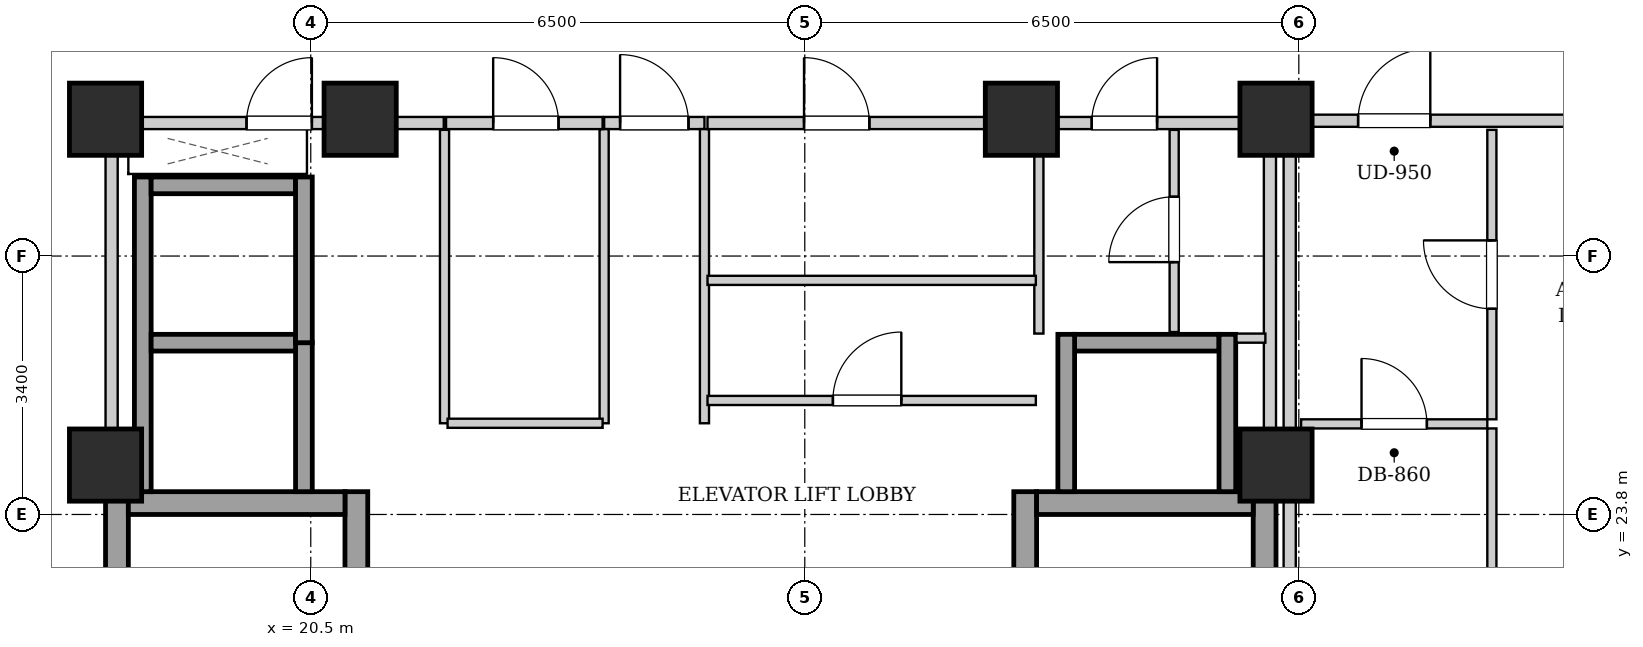
"""IFC4 building model, lengths in metres.
Left out: names, types, materials, properties, quantities, classifications, styles, units other than length and angle.
Written with IfcOpenShell. Run it as: python <this file> out.ifc"""

import sys

from ifc_helpers import new_model, si_unit, direction, frame, frame_2d, origin, origin_2d, place, context, subcontext, project, spatial, rectangle, extrude, element, fill, save


model = new_model("IFC4")
c1 = context("Model", 3, precision=1e-05, world=origin(), true_north=direction((0.0, 1.0)))
c2 = subcontext(c1, "Body", "Model", "MODEL_VIEW")
j1 = project(units=[si_unit("LENGTHUNIT", "METRE"), si_unit("PLANEANGLEUNIT", "RADIAN")], contexts=[c1])
p1 = place(None, origin())
s1 = spatial("IfcSite", under=j1, at=p1, CompositionType="ELEMENT")
p2 = place(p1, origin())
s2 = spatial("IfcBuilding", under=s1, at=p2, CompositionType="ELEMENT")
p3 = place(p2, frame((0.0, 0.0, 134.15)))
s3 = spatial("IfcBuildingStorey", under=s2, at=p3, CompositionType="ELEMENT", Elevation=134.15)
for number, where, z_axis, x_axis in (
    (1, (17.8, 29.0, 0.0), (0.0, 0.0, 1.0), (1.0, 0.0, 0.0)),
    (2, (21.15, 29.0, 0.0), (0.0, 0.0, 1.0), (1.0, 0.0, 0.0)),
    (3, (29.85, 29.0, 0.0), (0.0, 0.0, 1.0), (1.0, 0.0, 0.0)),
    (4, (33.2, 29.0, 0.0), (0.0, 0.0, 1.0), (1.0, 0.0, 0.0)),
    (5, (17.8, 24.45, 0.0), (0.0, 0.0, 1.0), (1.0, 0.0, 0.0)),
    (6, (33.2, 24.45, 0.0), (0.0, 0.0, 1.0), (1.0, 0.0, 0.0)),
):
    element("IfcColumn", number, at=place(p3, frame(where, z_axis=z_axis, x_axis=x_axis)), inside=s3, PredefinedType="COLUMN", context=c2, shape_type="SweptSolid", body=[
        extrude(rectangle(XDim=0.95, YDim=0.95, at=origin_2d()), origin(), (0.0, 0.0, 1.0), 3.25),
    ])
for number, where, z_axis, x_axis in (
    (7, (17.95, 15.1, 0.0), (0.0, 0.0, 1.0), (0.0, 1.0, 0.0)),
    (8, (21.1, 15.1, 0.0), (0.0, 0.0, 1.0), (0.0, 1.0, 0.0)),
):
    element("IfcWall", number, at=place(p3, frame(where, z_axis=z_axis, x_axis=x_axis)), inside=s3, PredefinedType="SHEAR", context=c2, shape_type="SweptSolid", body=[
        extrude(rectangle(XDim=9.0, YDim=0.3, at=frame_2d((4.5, 0.0))), origin(), (0.0, 0.0, 1.0), 2.99),
    ])
p4 = place(p3, frame((18.1, 23.95, 0.0), z_axis=(0.0, 0.0, 1.0), x_axis=(1.0, 0.0, 0.0)))
e9 = element("IfcWall", 9, at=p4, inside=s3, PredefinedType="SHEAR", context=c2, shape_type="SweptSolid", body=[
    extrude(rectangle(XDim=2.85, YDim=0.3, at=frame_2d((1.425, 0.0))), origin(), (0.0, 0.0, 1.0), 2.99),
])
for number, where, z_axis, x_axis in (
    (10, (29.9, 15.1, 0.0), (0.0, 0.0, 1.0), (0.0, 1.0, 0.0)),
    (11, (33.05, 15.1, 0.0), (0.0, 0.0, 1.0), (0.0, 1.0, 0.0)),
):
    element("IfcWall", number, at=place(p3, frame(where, z_axis=z_axis, x_axis=x_axis)), inside=s3, PredefinedType="SHEAR", context=c2, shape_type="SweptSolid", body=[
        extrude(rectangle(XDim=9.0, YDim=0.3, at=frame_2d((4.5, 0.0))), origin(), (0.0, 0.0, 1.0), 2.99),
    ])
p5 = place(p3, frame((30.05, 23.95, 0.0), z_axis=(0.0, 0.0, 1.0), x_axis=(1.0, 0.0, 0.0)))
e12 = element("IfcWall", 12, at=p5, inside=s3, PredefinedType="SHEAR", context=c2, shape_type="SweptSolid", body=[
    extrude(rectangle(XDim=2.85, YDim=0.3, at=frame_2d((1.425, 0.0))), origin(), (0.0, 0.0, 1.0), 2.99),
])
p6 = place(p3, frame((18.29, 24.1, 0.0), z_axis=(0.0, 0.0, 1.0), x_axis=(0.0, 1.0, 0.0)))
e13 = element("IfcWall", 13, at=p6, inside=s3, PredefinedType="SHEAR", context=c2, shape_type="SweptSolid", body=[
    extrude(rectangle(XDim=4.14, YDim=0.22, at=frame_2d((2.07, 0.0))), origin(), (0.0, 0.0, 1.0), 2.99),
])
p7 = place(p3, frame((20.41, 24.1, 0.0), z_axis=(0.0, 0.0, 1.0), x_axis=(0.0, 1.0, 0.0)))
e14 = element("IfcWall", 14, at=p7, inside=s3, PredefinedType="SHEAR", context=c2, shape_type="SweptSolid", body=[
    extrude(rectangle(XDim=1.96, YDim=0.22, at=frame_2d((0.98, 0.0))), origin(), (0.0, 0.0, 1.0), 2.99),
])
for number, where, z_axis, x_axis in (
    (15, (18.4, 26.06, 0.0), (0.0, 0.0, 1.0), (1.0, 0.0, 0.0)),
    (16, (18.4, 28.13, 0.0), (0.0, 0.0, 1.0), (1.0, 0.0, 0.0)),
):
    element("IfcWall", number, at=place(p3, frame(where, z_axis=z_axis, x_axis=x_axis)), inside=s3, PredefinedType="SHEAR", context=c2, shape_type="SweptSolid", body=[
        extrude(rectangle(XDim=1.9, YDim=0.22, at=frame_2d((0.95, 0.0))), origin(), (0.0, 0.0, 1.0), 2.99),
    ])
p8 = place(p3, frame((20.41, 26.06, 0.0), z_axis=(0.0, 0.0, 1.0), x_axis=(0.0, 1.0, 0.0)))
e17 = element("IfcWall", 17, at=p8, inside=s3, PredefinedType="SHEAR", context=c2, shape_type="SweptSolid", body=[
    extrude(rectangle(XDim=2.18, YDim=0.22, at=frame_2d((1.09, 0.0))), origin(), (0.0, 0.0, 1.0), 2.99),
])
p9 = place(p3, frame((30.55, 26.06, 0.0), z_axis=(0.0, 0.0, 1.0), x_axis=(1.0, 0.0, 0.0)))
e18 = element("IfcWall", 18, at=p9, inside=s3, PredefinedType="SHEAR", context=c2, shape_type="SweptSolid", body=[
    extrude(rectangle(XDim=1.9, YDim=0.22, at=frame_2d((0.95, 0.0))), origin(), (0.0, 0.0, 1.0), 2.99),
])
for number, where, z_axis, x_axis in (
    (19, (30.44, 24.1, 0.0), (0.0, 0.0, 1.0), (0.0, 1.0, 0.0)),
    (20, (32.56, 24.1, 0.0), (0.0, 0.0, 1.0), (0.0, 1.0, 0.0)),
):
    element("IfcWall", number, at=place(p3, frame(where, z_axis=z_axis, x_axis=x_axis)), inside=s3, PredefinedType="SHEAR", context=c2, shape_type="SweptSolid", body=[
        extrude(rectangle(XDim=2.07, YDim=0.22, at=frame_2d((1.035, 0.0))), origin(), (0.0, 0.0, 1.0), 2.99),
    ])
for number, where, z_axis, x_axis in (
    (21, (17.88, 24.12, 0.0), (0.0, 0.0, 1.0), (0.0, 1.0, 0.0)),
    (22, (33.12, 24.12, 0.0), (0.0, 0.0, 1.0), (0.0, 1.0, 0.0)),
):
    element("IfcWall", number, at=place(p3, frame(where, z_axis=z_axis, x_axis=x_axis)), inside=s3, PredefinedType="PARTITIONING", context=c2, shape_type="SweptSolid", body=[
        extrude(rectangle(XDim=4.76, YDim=0.16, at=frame_2d((2.38, 0.0))), origin(), (0.0, 0.0, 1.0), 2.99),
    ])
p10 = place(p3, frame((24.36, 28.95, 0.0), z_axis=(0.0, 0.0, 1.0), x_axis=(1.0, 0.0, 0.0)))
e23 = element("IfcWall", 23, at=p10, inside=s3, PredefinedType="PARTITIONING", context=c2, shape_type="SweptSolid", body=[
    extrude(rectangle(XDim=1.32, YDim=0.16, at=frame_2d((0.66, 0.0))), origin(), (0.0, 0.0, 1.0), 2.426),
])
p11 = place(p10, frame((0.21, 0.0, 0.0)))
e24 = element("IfcOpeningElement", 24, at=p11, cuts=e23, PredefinedType="OPENING", context=c2, shape_type="SweptSolid", body=[
    extrude(rectangle(XDim=0.9, YDim=2.05, at=frame_2d((0.45, 1.025))), frame((0.0, 0.09, 0.0), z_axis=(0.0, -1.0, 0.0), x_axis=(1.0, 0.0, 0.0)), (0.0, 0.0, 1.0), 0.18),
])
p12 = place(p3, frame((17.96, 28.95, 0.0), z_axis=(0.0, 0.0, 1.0), x_axis=(1.0, 0.0, 0.0)))
e25 = element("IfcWall", 25, at=p12, inside=s3, PredefinedType="PARTITIONING", context=c2, shape_type="SweptSolid", body=[
    extrude(rectangle(XDim=4.29, YDim=0.16, at=frame_2d((2.145, 0.0))), origin(), (0.0, 0.0, 1.0), 2.426),
])
p13 = place(p12, frame((1.695, 0.0, 0.0)))
e26 = element("IfcOpeningElement", 26, at=p13, cuts=e25, PredefinedType="OPENING", context=c2, shape_type="SweptSolid", body=[
    extrude(rectangle(XDim=0.86, YDim=2.05, at=frame_2d((0.43, 1.025))), frame((0.0, 0.09, 0.0), z_axis=(0.0, -1.0, 0.0), x_axis=(1.0, 0.0, 0.0)), (0.0, 0.0, 1.0), 0.18),
])
for number, where, z_axis, x_axis in (
    (27, (24.36, 25.0, 0.0), (0.0, 0.0, 1.0), (0.0, 1.0, 0.0)),
    (28, (25.68, 25.0, 0.0), (0.0, 0.0, 1.0), (0.0, 1.0, 0.0)),
):
    element("IfcWall", number, at=place(p3, frame(where, z_axis=z_axis, x_axis=x_axis)), inside=s3, PredefinedType="PARTITIONING", context=c2, shape_type="SweptSolid", body=[
        extrude(rectangle(XDim=3.87, YDim=0.12, at=frame_2d((1.935, 0.0))), origin(), (0.0, 0.0, 1.0), 2.99),
    ])
p14 = place(p3, frame((30.08, 26.18, 0.0), z_axis=(0.0, 0.0, 1.0), x_axis=(0.0, 1.0, 0.0)))
e29 = element("IfcWall", 29, at=p14, inside=s3, PredefinedType="PARTITIONING", context=c2, shape_type="SweptSolid", body=[
    extrude(rectangle(XDim=2.68, YDim=0.12, at=frame_2d((1.34, 0.0))), origin(), (0.0, 0.0, 1.0), 2.99),
])
p15 = place(p3, frame((32.68, 26.12, 0.0), z_axis=(0.0, 0.0, 1.0), x_axis=(1.0, 0.0, 0.0)))
e30 = element("IfcWall", 30, at=p15, inside=s3, PredefinedType="PARTITIONING", context=c2, shape_type="SweptSolid", body=[
    extrude(rectangle(XDim=0.38, YDim=0.12, at=frame_2d((0.19, 0.0))), origin(), (0.0, 0.0, 1.0), 2.99),
])
p16 = place(p3, frame((31.86, 26.2, 0.0), z_axis=(0.0, 0.0, 1.0), x_axis=(0.0, 1.0, 0.0)))
e31 = element("IfcWall", 31, at=p16, inside=s3, PredefinedType="PARTITIONING", context=c2, shape_type="SweptSolid", body=[
    extrude(rectangle(XDim=2.66, YDim=0.12, at=frame_2d((1.33, 0.0))), origin(), (0.0, 0.0, 1.0), 2.99),
])
p17 = place(p16, frame((0.92, 0.0, 0.0)))
e32 = element("IfcOpeningElement", 32, at=p17, cuts=e31, PredefinedType="OPENING", context=c2, shape_type="SweptSolid", body=[
    extrude(rectangle(XDim=0.86, YDim=2.05, at=frame_2d((0.43, 1.025))), frame((0.0, 0.07, 0.0), z_axis=(0.0, -1.0, 0.0), x_axis=(1.0, 0.0, 0.0)), (0.0, 0.0, 1.0), 0.14),
])
p18 = place(p3, frame((30.08, 28.95, 0.0), z_axis=(0.0, 0.0, 1.0), x_axis=(1.0, 0.0, 0.0)))
e33 = element("IfcWall", 33, at=p18, inside=s3, PredefinedType="PARTITIONING", context=c2, shape_type="SweptSolid", body=[
    extrude(rectangle(XDim=2.96, YDim=0.16, at=frame_2d((1.48, 0.0))), origin(), (0.0, 0.0, 1.0), 2.99),
])
p19 = place(p18, frame((0.695, 0.0, 0.0)))
e34 = element("IfcOpeningElement", 34, at=p19, cuts=e33, PredefinedType="OPENING", context=c2, shape_type="SweptSolid", body=[
    extrude(rectangle(XDim=0.86, YDim=2.05, at=frame_2d((0.43, 1.025))), frame((0.0, 0.09, 0.0), z_axis=(0.0, -1.0, 0.0), x_axis=(1.0, 0.0, 0.0)), (0.0, 0.0, 1.0), 0.18),
])
p20 = place(p3, frame((22.26, 25.0, 0.0), z_axis=(0.0, 0.0, 1.0), x_axis=(0.0, 1.0, 0.0)))
e35 = element("IfcWall", 35, at=p20, inside=s3, PredefinedType="PARTITIONING", context=c2, shape_type="SweptSolid", body=[
    extrude(rectangle(XDim=3.86, YDim=0.12, at=frame_2d((1.93, 0.0))), origin(), (0.0, 0.0, 1.0), 2.99),
])
p21 = place(p3, frame((22.3, 25.0, 0.0), z_axis=(0.0, 0.0, 1.0), x_axis=(1.0, 0.0, 0.0)))
e36 = element("IfcWall", 36, at=p21, inside=s3, PredefinedType="PARTITIONING", context=c2, shape_type="SweptSolid", body=[
    extrude(rectangle(XDim=2.04, YDim=0.12, at=frame_2d((1.02, 0.0))), origin(), (0.0, 0.0, 1.0), 2.99),
])
p22 = place(p3, frame((22.28, 28.95, 0.0), z_axis=(0.0, 0.0, 1.0), x_axis=(1.0, 0.0, 0.0)))
e37 = element("IfcWall", 37, at=p22, inside=s3, PredefinedType="PARTITIONING", context=c2, shape_type="SweptSolid", body=[
    extrude(rectangle(XDim=2.06, YDim=0.16, at=frame_2d((1.03, 0.0))), origin(), (0.0, 0.0, 1.0), 2.426),
])
p23 = place(p22, frame((0.62, 0.0, 0.0)))
e38 = element("IfcOpeningElement", 38, at=p23, cuts=e37, PredefinedType="OPENING", context=c2, shape_type="SweptSolid", body=[
    extrude(rectangle(XDim=0.86, YDim=2.05, at=frame_2d((0.43, 1.025))), frame((0.0, 0.09, 0.0), z_axis=(0.0, -1.0, 0.0), x_axis=(1.0, 0.0, 0.0)), (0.0, 0.0, 1.0), 0.18),
])
p24 = place(p3, frame((25.72, 26.88, 0.0), z_axis=(0.0, 0.0, 1.0), x_axis=(1.0, 0.0, 0.0)))
e39 = element("IfcWall", 39, at=p24, inside=s3, PredefinedType="PARTITIONING", context=c2, shape_type="SweptSolid", body=[
    extrude(rectangle(XDim=4.32, YDim=0.12, at=frame_2d((2.16, 0.0))), origin(), (0.0, 0.0, 1.0), 2.99),
])
p25 = place(p3, frame((25.72, 25.3, 0.0), z_axis=(0.0, 0.0, 1.0), x_axis=(1.0, 0.0, 0.0)))
e40 = element("IfcWall", 40, at=p25, inside=s3, PredefinedType="PARTITIONING", context=c2, shape_type="SweptSolid", body=[
    extrude(rectangle(XDim=4.32, YDim=0.12, at=frame_2d((2.16, 0.0))), origin(), (0.0, 0.0, 1.0), 2.99),
])
p26 = place(p25, frame((1.65, 0.0, 0.0)))
e41 = element("IfcOpeningElement", 41, at=p26, cuts=e40, PredefinedType="OPENING", context=c2, shape_type="SweptSolid", body=[
    extrude(rectangle(XDim=0.9, YDim=2.05, at=frame_2d((0.45, 1.025))), frame((0.0, 0.07, 0.0), z_axis=(0.0, -1.0, 0.0), x_axis=(1.0, 0.0, 0.0)), (0.0, 0.0, 1.0), 0.14),
])
p27 = place(p3, frame((25.72, 28.95, 0.0), z_axis=(0.0, 0.0, 1.0), x_axis=(1.0, 0.0, 0.0)))
e42 = element("IfcWall", 42, at=p27, inside=s3, PredefinedType="PARTITIONING", context=c2, shape_type="SweptSolid", body=[
    extrude(rectangle(XDim=4.32, YDim=0.16, at=frame_2d((2.16, 0.0))), origin(), (0.0, 0.0, 1.0), 2.426),
])
p28 = place(p27, frame((1.27, 0.0, 0.0)))
e43 = element("IfcOpeningElement", 43, at=p28, cuts=e42, PredefinedType="OPENING", context=c2, shape_type="SweptSolid", body=[
    extrude(rectangle(XDim=0.86, YDim=2.05, at=frame_2d((0.43, 1.025))), frame((0.0, 0.09, 0.0), z_axis=(0.0, -1.0, 0.0), x_axis=(1.0, 0.0, 0.0)), (0.0, 0.0, 1.0), 0.18),
])
p29 = place(p3, frame((33.38, 28.98, 0.0), z_axis=(0.0, 0.0, 1.0), x_axis=(1.0, 0.0, 0.0)))
e44 = element("IfcWall", 44, at=p29, inside=s3, PredefinedType="PARTITIONING", context=c2, shape_type="SweptSolid", body=[
    extrude(rectangle(XDim=6.64, YDim=0.16, at=frame_2d((3.32, 0.0))), origin(), (0.0, 0.0, 1.0), 2.426),
])
p30 = place(p29, frame((0.9, 0.0, 0.0)))
e45 = element("IfcOpeningElement", 45, at=p30, cuts=e44, PredefinedType="OPENING", context=c2, shape_type="SweptSolid", body=[
    extrude(rectangle(XDim=0.95, YDim=2.1, at=frame_2d((0.475, 1.05))), frame((0.0, 0.09, 0.0), z_axis=(0.0, -1.0, 0.0), x_axis=(1.0, 0.0, 0.0)), (0.0, 0.0, 1.0), 0.18),
])
p31 = place(p3, frame((33.53, 24.992, 0.0), z_axis=(0.0, 0.0, 1.0), x_axis=(1.0, 0.0, 0.0)))
e46 = element("IfcWall", 46, at=p31, inside=s3, PredefinedType="PARTITIONING", context=c2, shape_type="SweptSolid", body=[
    extrude(rectangle(XDim=2.45, YDim=0.12, at=frame_2d((1.225, 0.0))), origin(), (0.0, 0.0, 1.0), 2.99),
])
p32 = place(p31, frame((0.795, 0.0, 0.0)))
e47 = element("IfcOpeningElement", 47, at=p32, cuts=e46, PredefinedType="OPENING", context=c2, shape_type="SweptSolid", body=[
    extrude(rectangle(XDim=0.86, YDim=2.05, at=frame_2d((0.43, 1.025))), frame((0.0, 0.07, 0.0), z_axis=(0.0, -1.0, 0.0), x_axis=(1.0, 0.0, 0.0)), (0.0, 0.0, 1.0), 0.14),
])
p33 = place(p3, frame((36.04, 23.082, 0.0), z_axis=(0.0, 0.0, 1.0), x_axis=(0.0, 1.0, 0.0)))
e48 = element("IfcWall", 48, at=p33, inside=s3, PredefinedType="PARTITIONING", context=c2, shape_type="SweptSolid", body=[
    extrude(rectangle(XDim=1.85, YDim=0.12, at=frame_2d((0.925, 0.0))), origin(), (0.0, 0.0, 1.0), 2.99),
])
p34 = place(p3, frame((36.04, 25.052, 0.0), z_axis=(0.0, 0.0, 1.0), x_axis=(0.0, 1.0, 0.0)))
e49 = element("IfcWall", 49, at=p34, inside=s3, PredefinedType="PARTITIONING", context=c2, shape_type="SweptSolid", body=[
    extrude(rectangle(XDim=3.808, YDim=0.12, at=frame_2d((1.904, 0.0))), origin(), (0.0, 0.0, 1.0), 2.99),
])
p35 = place(p34, frame((1.454, 0.0, 0.0)))
e50 = element("IfcOpeningElement", 50, at=p35, cuts=e49, PredefinedType="OPENING", context=c2, shape_type="SweptSolid", body=[
    extrude(rectangle(XDim=0.9, YDim=2.05, at=frame_2d((0.45, 1.025))), frame((0.0, 0.07, 0.0), z_axis=(0.0, -1.0, 0.0), x_axis=(1.0, 0.0, 0.0)), (0.0, 0.0, 1.0), 0.14),
])
p36 = place(p3, frame((33.38, 15.02, 0.0), z_axis=(0.0, 0.0, 1.0), x_axis=(0.0, 1.0, 0.0)))
e51 = element("IfcWall", 51, at=p36, inside=s3, PredefinedType="PARTITIONING", context=c2, shape_type="SweptSolid", body=[
    extrude(rectangle(XDim=13.98, YDim=0.16, at=frame_2d((6.99, 0.0))), origin(), (0.0, 0.0, 1.0), 2.99),
])
p37 = place(p11, origin())
e52 = element("IfcDoor", 52, at=p37, inside=s3, OperationType="SINGLE_SWING_LEFT", PredefinedType="DOOR", context=c2, shape_type="SweptSolid", body=[
    extrude(rectangle(XDim=0.9, YDim=2.05, at=frame_2d((0.45, 1.025))), frame((0.0, 0.025, 0.0), z_axis=(0.0, -1.0, 0.0), x_axis=(1.0, 0.0, 0.0)), (0.0, 0.0, 1.0), 0.05),
])
fill(e24, e52)
p38 = place(p13, origin())
e53 = element("IfcDoor", 53, at=p38, inside=s3, OperationType="SINGLE_SWING_RIGHT", PredefinedType="DOOR", context=c2, shape_type="SweptSolid", body=[
    extrude(rectangle(XDim=0.86, YDim=2.05, at=frame_2d((0.43, 1.025))), frame((0.0, 0.025, 0.0), z_axis=(0.0, -1.0, 0.0), x_axis=(1.0, 0.0, 0.0)), (0.0, 0.0, 1.0), 0.05),
])
fill(e26, e53)
p39 = place(p17, origin())
e54 = element("IfcDoor", 54, at=p39, inside=s3, OperationType="SINGLE_SWING_LEFT", PredefinedType="DOOR", context=c2, shape_type="SweptSolid", body=[
    extrude(rectangle(XDim=0.86, YDim=2.05, at=frame_2d((0.43, 1.025))), frame((0.0, 0.025, 0.0), z_axis=(0.0, -1.0, 0.0), x_axis=(1.0, 0.0, 0.0)), (0.0, 0.0, 1.0), 0.05),
])
fill(e32, e54)
p40 = place(p19, origin())
e55 = element("IfcDoor", 55, at=p40, inside=s3, OperationType="SINGLE_SWING_RIGHT", PredefinedType="DOOR", context=c2, shape_type="SweptSolid", body=[
    extrude(rectangle(XDim=0.86, YDim=2.05, at=frame_2d((0.43, 1.025))), frame((0.0, 0.025, 0.0), z_axis=(0.0, -1.0, 0.0), x_axis=(1.0, 0.0, 0.0)), (0.0, 0.0, 1.0), 0.05),
])
fill(e34, e55)
p41 = place(p23, origin())
e56 = element("IfcDoor", 56, at=p41, inside=s3, OperationType="SINGLE_SWING_LEFT", PredefinedType="DOOR", context=c2, shape_type="SweptSolid", body=[
    extrude(rectangle(XDim=0.86, YDim=2.05, at=frame_2d((0.43, 1.025))), frame((0.0, 0.025, 0.0), z_axis=(0.0, -1.0, 0.0), x_axis=(1.0, 0.0, 0.0)), (0.0, 0.0, 1.0), 0.05),
])
fill(e38, e56)
p42 = place(p26, origin())
e57 = element("IfcDoor", 57, at=p42, inside=s3, OperationType="SINGLE_SWING_RIGHT", PredefinedType="DOOR", context=c2, shape_type="SweptSolid", body=[
    extrude(rectangle(XDim=0.9, YDim=2.05, at=frame_2d((0.45, 1.025))), frame((0.0, 0.025, 0.0), z_axis=(0.0, -1.0, 0.0), x_axis=(1.0, 0.0, 0.0)), (0.0, 0.0, 1.0), 0.05),
])
fill(e41, e57)
p43 = place(p28, origin())
e58 = element("IfcDoor", 58, at=p43, inside=s3, OperationType="SINGLE_SWING_LEFT", PredefinedType="DOOR", context=c2, shape_type="SweptSolid", body=[
    extrude(rectangle(XDim=0.86, YDim=2.05, at=frame_2d((0.43, 1.025))), frame((0.0, 0.025, 0.0), z_axis=(0.0, -1.0, 0.0), x_axis=(1.0, 0.0, 0.0)), (0.0, 0.0, 1.0), 0.05),
])
fill(e43, e58)
p44 = place(p30, origin())
e59 = element("IfcDoor", 59, at=p44, inside=s3, OperationType="SINGLE_SWING_RIGHT", PredefinedType="DOOR", context=c2, shape_type="SweptSolid", body=[
    extrude(rectangle(XDim=0.95, YDim=2.1, at=frame_2d((0.475, 1.05))), frame((0.0, 0.025, 0.0), z_axis=(0.0, -1.0, 0.0), x_axis=(1.0, 0.0, 0.0)), (0.0, 0.0, 1.0), 0.05),
])
fill(e45, e59)
p45 = place(p32, origin())
e60 = element("IfcDoor", 60, at=p45, inside=s3, OperationType="SINGLE_SWING_LEFT", PredefinedType="DOOR", context=c2, shape_type="SweptSolid", body=[
    extrude(rectangle(XDim=0.86, YDim=2.05, at=frame_2d((0.43, 1.025))), frame((0.0, 0.025, 0.0), z_axis=(0.0, -1.0, 0.0), x_axis=(1.0, 0.0, 0.0)), (0.0, 0.0, 1.0), 0.05),
])
fill(e47, e60)
p46 = place(p35, origin())
e61 = element("IfcDoor", 61, at=p46, inside=s3, OperationType="SINGLE_SWING_RIGHT", PredefinedType="DOOR", context=c2, shape_type="SweptSolid", body=[
    extrude(rectangle(XDim=0.9, YDim=2.05, at=frame_2d((0.45, 1.025))), frame((0.0, 0.025, 0.0), z_axis=(0.0, -1.0, 0.0), x_axis=(1.0, 0.0, 0.0)), (0.0, 0.0, 1.0), 0.05),
])
fill(e50, e61)
save(model, sys.argv[1])
